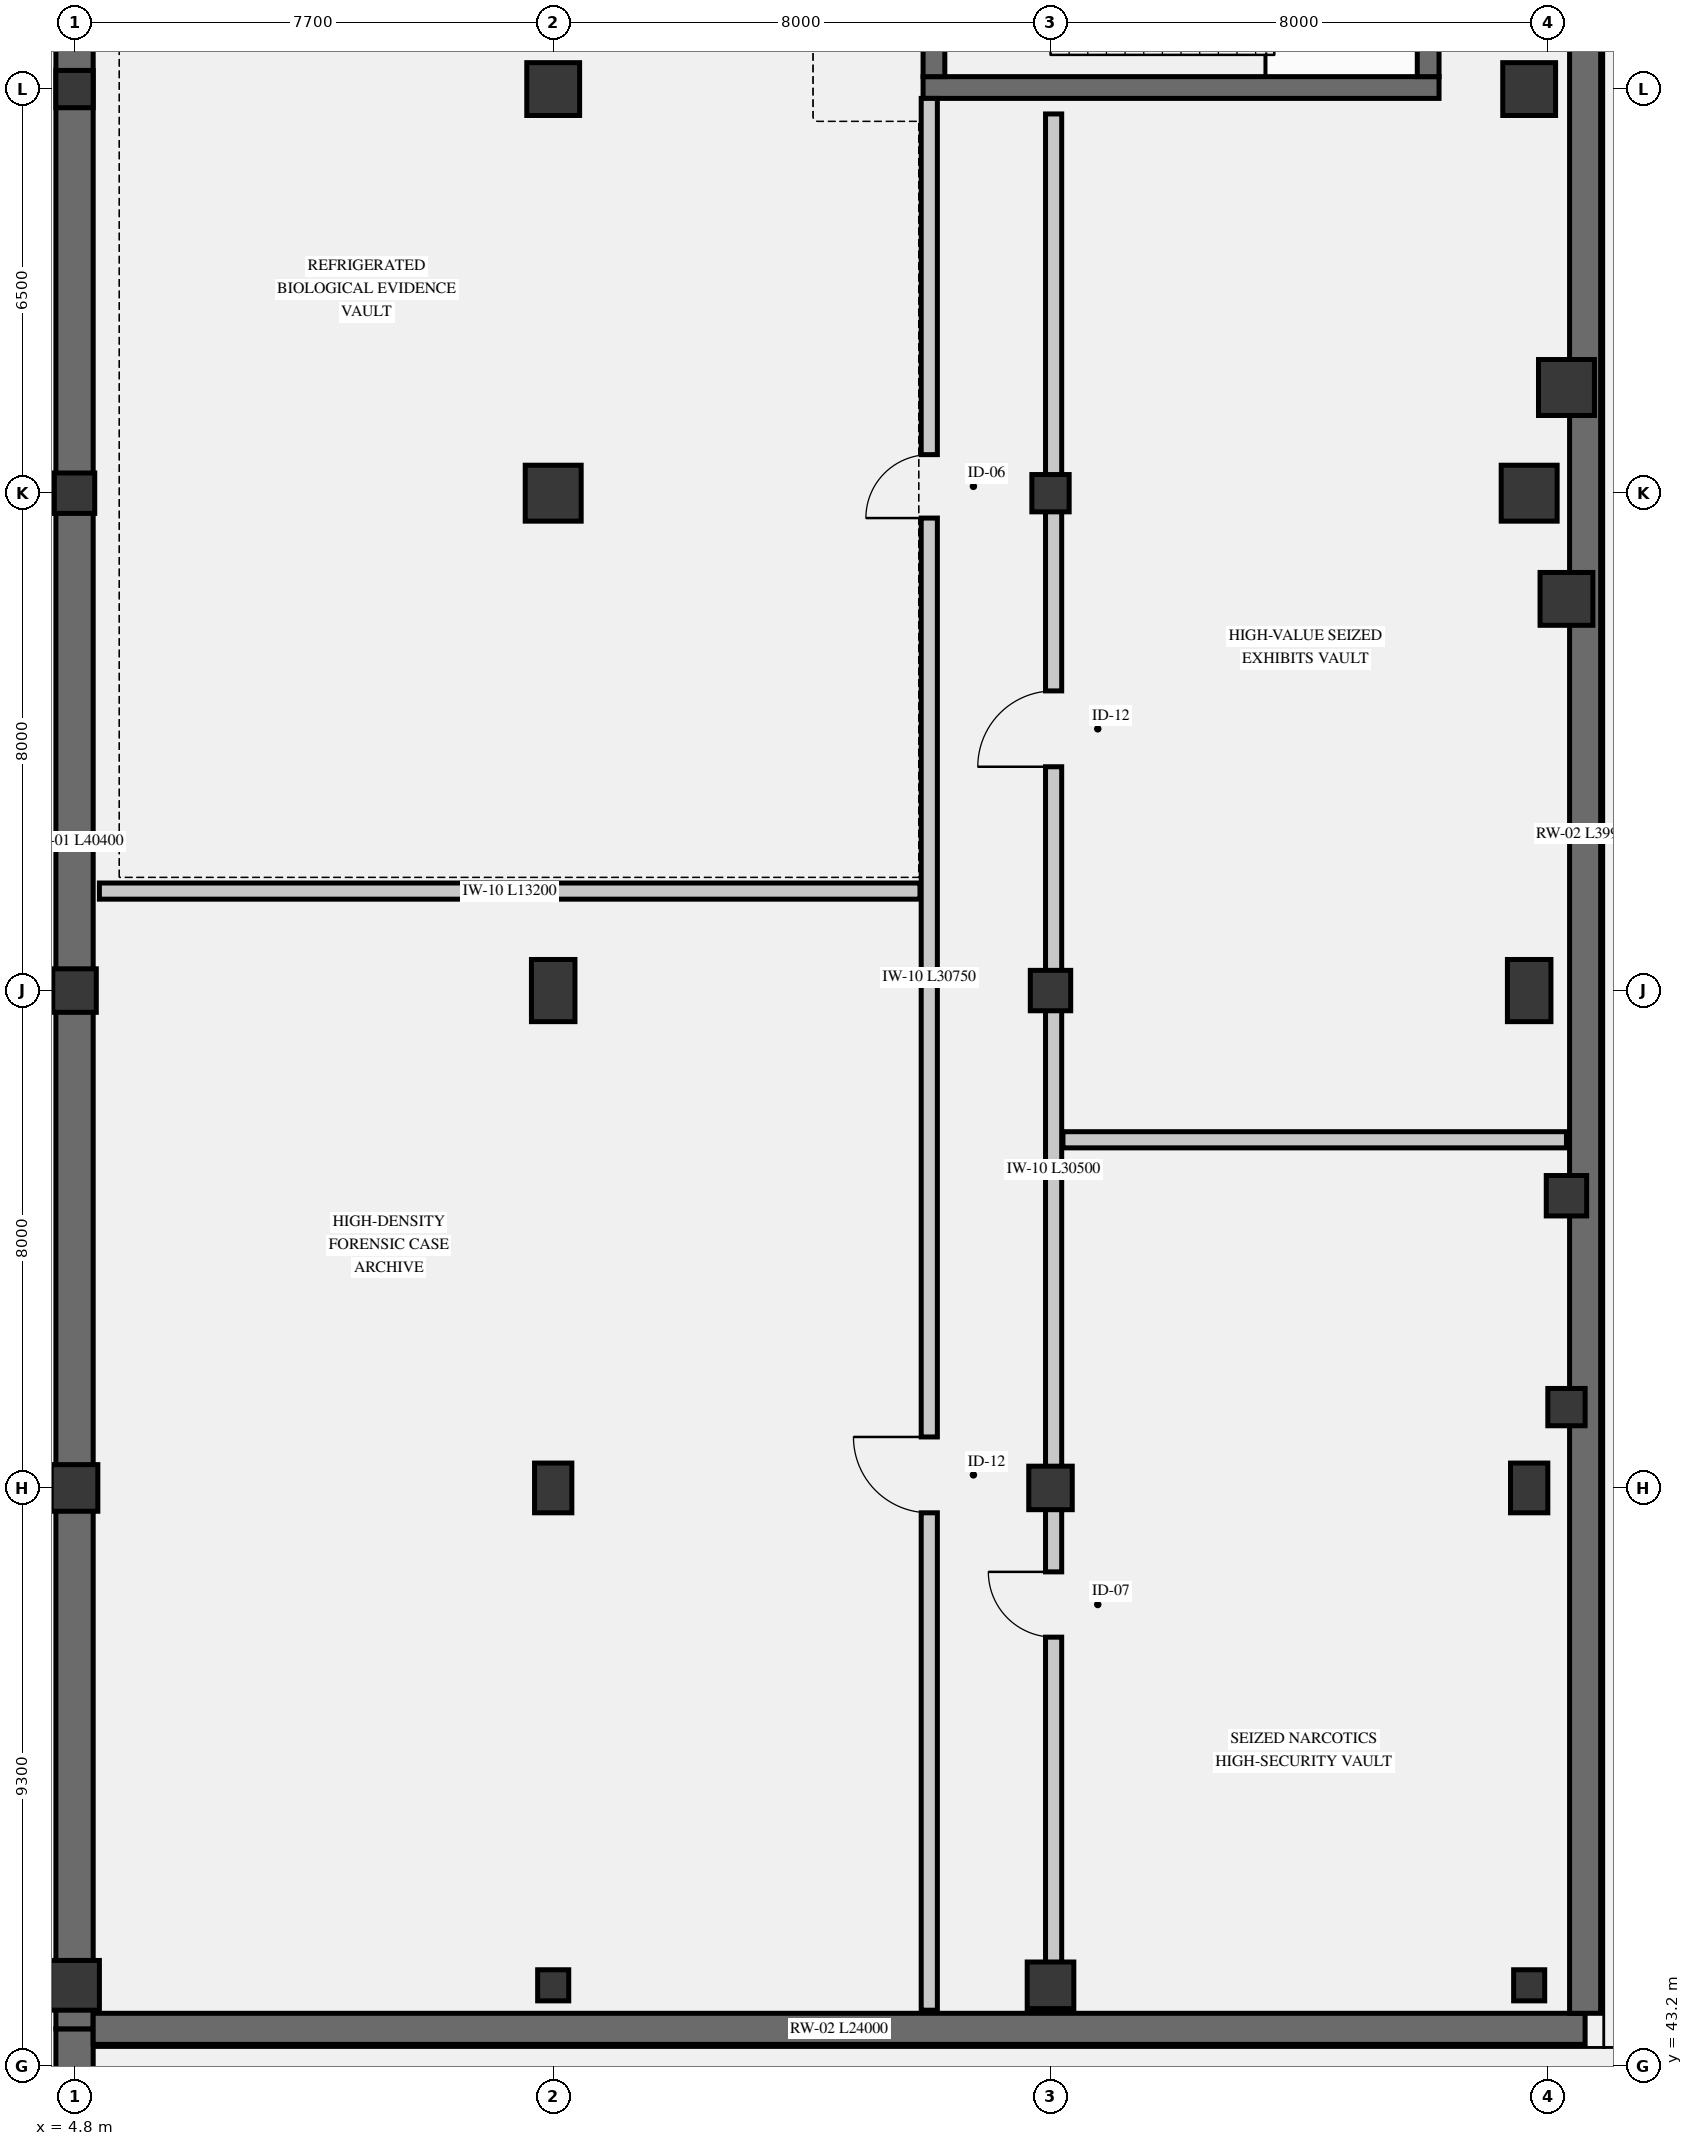
"""IFC4 building model, lengths in metres.
Left out: names, types, materials, properties, quantities, classifications, styles, units other than length and angle.
Written with IfcOpenShell. Run it as: python <this file> out.ifc"""

import sys

from ifc_helpers import new_model, si_unit, direction, frame, frame_2d, origin, origin_2d, place, context, subcontext, project, spatial, rectangle, extrude, element, fill, save


model = new_model("IFC4")
c1 = context("Model", 3, precision=1e-05, world=origin(), true_north=direction((0.0, 1.0)))
c2 = subcontext(c1, "Body", "Model", "MODEL_VIEW")
j1 = project(units=[si_unit("LENGTHUNIT", "METRE"), si_unit("PLANEANGLEUNIT", "RADIAN")], contexts=[c1])
p1 = place(None, origin())
s1 = spatial("IfcSite", under=j1, at=p1, CompositionType="ELEMENT")
p2 = place(p1, origin())
s2 = spatial("IfcBuilding", under=s1, at=p2, CompositionType="ELEMENT")
p3 = place(p2, frame((0.0, 0.0, -8.4)))
s3 = spatial("IfcBuildingStorey", under=s2, at=p3, CompositionType="ELEMENT", Elevation=-8.4)
p4 = place(p3, frame((4.8, 5.1, 0.0), z_axis=(0.0, 0.0, 1.0), x_axis=(0.0, 1.0, 0.0)))
e1 = element("IfcWall", 1, at=p4, inside=s3, PredefinedType="USERDEFINED", context=c2, shape_type="SweptSolid", body=[
    extrude(rectangle(XDim=38.7, YDim=0.6, at=frame_2d((19.35, 0.0))), origin(), (0.0, 0.0, 1.0), 4.2),
])
p5 = place(p3, frame((4.8, 43.8, 0.0), z_axis=(0.0, 0.0, 1.0), x_axis=(0.0, 1.0, 0.0)))
e2 = element("IfcWall", 2, at=p5, inside=s3, PredefinedType="USERDEFINED", context=c2, shape_type="SweptSolid", body=[
    extrude(rectangle(XDim=40.4, YDim=0.6, at=frame_2d((20.2, 0.0))), origin(), (0.0, 0.0, 1.0), 3.92),
])
p6 = place(p3, frame((5.1, 43.8, 0.0), z_axis=(0.0, 0.0, 1.0), x_axis=(1.0, 0.0, 0.0)))
e3 = element("IfcWall", 3, at=p6, inside=s3, PredefinedType="USERDEFINED", context=c2, shape_type="SweptSolid", body=[
    extrude(rectangle(XDim=24.0, YDim=0.5, at=frame_2d((12.0, 0.0))), origin(), (0.0, 0.0, 1.0), 3.92),
])
p7 = place(p3, frame((29.1, 44.05, 0.0), z_axis=(0.0, 0.0, 1.0), x_axis=(0.0, 1.0, 0.0)))
e4 = element("IfcWall", 4, at=p7, inside=s3, PredefinedType="USERDEFINED", context=c2, shape_type="SweptSolid", body=[
    extrude(rectangle(XDim=39.9, YDim=0.5, at=frame_2d((19.95, 0.0))), origin(), (0.0, 0.0, 1.0), 3.92),
])
p8 = place(p3, frame((18.45, 75.025, 0.0), z_axis=(0.0, 0.0, 1.0), x_axis=(1.0, 0.0, 0.0)))
e5 = element("IfcWall", 5, at=p8, inside=s3, PredefinedType="SHEAR", context=c2, shape_type="SweptSolid", body=[
    extrude(rectangle(XDim=8.3, YDim=0.35, at=frame_2d((4.15, 0.0))), origin(), (0.0, 0.0, 1.0), 3.92),
])
p9 = place(p3, frame((18.625, 75.2, 0.0), z_axis=(0.0, 0.0, 1.0), x_axis=(0.0, 1.0, 0.0)))
e6 = element("IfcWall", 6, at=p9, inside=s3, PredefinedType="SHEAR", context=c2, shape_type="SweptSolid", body=[
    extrude(rectangle(XDim=6.8, YDim=0.35, at=frame_2d((3.4, 0.0))), origin(), (0.0, 0.0, 1.0), 3.92),
])
p10 = place(p9, frame((2.6, 0.0, 0.0)))
e7 = element("IfcOpeningElement", 7, at=p10, cuts=e6, PredefinedType="OPENING", context=c2, shape_type="SweptSolid", body=[
    extrude(rectangle(XDim=1.25, YDim=2.2, at=frame_2d((0.625, 1.1))), frame((0.0, 0.185, 0.0), z_axis=(0.0, -1.0, 0.0), x_axis=(1.0, 0.0, 0.0)), (0.0, 0.0, 1.0), 0.37),
])
p11 = place(p3, frame((26.575, 75.2, 0.0), z_axis=(0.0, 0.0, 1.0), x_axis=(0.0, 1.0, 0.0)))
e8 = element("IfcWall", 8, at=p11, inside=s3, PredefinedType="SHEAR", context=c2, shape_type="SweptSolid", body=[
    extrude(rectangle(XDim=6.8, YDim=0.35, at=frame_2d((3.4, 0.0))), origin(), (0.0, 0.0, 1.0), 3.92),
])
p12 = place(p3, frame((28.8, 57.2, -0.44), z_axis=(0.0, 0.0, 1.0), x_axis=(1.0, 0.0, 0.0)))
e9 = element("IfcColumn", 9, at=p12, inside=s3, PredefinedType="COLUMN", context=c2, shape_type="SweptSolid", body=[
    extrude(rectangle(XDim=0.65, YDim=0.65, at=origin_2d()), origin(), (0.0, 0.0, 1.0), 4.64),
])
p13 = place(p3, frame((28.8, 53.8, -0.44), z_axis=(0.0, 0.0, 1.0), x_axis=(1.0, 0.0, 0.0)))
e10 = element("IfcColumn", 10, at=p13, inside=s3, PredefinedType="COLUMN", context=c2, shape_type="SweptSolid", body=[
    extrude(rectangle(XDim=0.6, YDim=0.6, at=origin_2d()), origin(), (0.0, 0.0, 1.0), 4.64),
])
p14 = place(p3, frame((28.8, 70.2, -0.44), z_axis=(0.0, 0.0, 1.0), x_axis=(1.0, 0.0, 0.0)))
e11 = element("IfcColumn", 11, at=p14, inside=s3, PredefinedType="COLUMN", context=c2, shape_type="SweptSolid", body=[
    extrude(rectangle(XDim=0.9, YDim=0.9, at=origin_2d()), origin(), (0.0, 0.0, 1.0), 4.64),
])
p15 = place(p3, frame((28.8, 66.8, -0.44), z_axis=(0.0, 0.0, 1.0), x_axis=(1.0, 0.0, 0.0)))
e12 = element("IfcColumn", 12, at=p15, inside=s3, PredefinedType="COLUMN", context=c2, shape_type="SweptSolid", body=[
    extrude(rectangle(XDim=0.85, YDim=0.85, at=origin_2d()), origin(), (0.0, 0.0, 1.0), 4.64),
])
p16 = place(p3, frame((4.8, 44.5, -0.44), z_axis=(0.0, 0.0, 1.0), x_axis=(1.0, 0.0, 0.0)))
e13 = element("IfcColumn", 13, at=p16, inside=s3, PredefinedType="COLUMN", context=c2, shape_type="SweptSolid", body=[
    extrude(rectangle(XDim=0.8, YDim=0.8, at=origin_2d()), origin(), (0.0, 0.0, 1.0), 4.64),
])
p17 = place(p3, frame((4.8, 52.5, -0.44), z_axis=(0.0, 0.0, 1.0), x_axis=(1.0, 0.0, 0.0)))
e14 = element("IfcColumn", 14, at=p17, inside=s3, PredefinedType="COLUMN", context=c2, shape_type="SweptSolid", body=[
    extrude(rectangle(XDim=0.75, YDim=0.75, at=origin_2d()), origin(), (0.0, 0.0, 1.0), 4.64),
])
p18 = place(p3, frame((4.8, 60.5, -0.44), z_axis=(0.0, 0.0, 1.0), x_axis=(1.0, 0.0, 0.0)))
e15 = element("IfcColumn", 15, at=p18, inside=s3, PredefinedType="COLUMN", context=c2, shape_type="SweptSolid", body=[
    extrude(rectangle(XDim=0.7, YDim=0.7, at=origin_2d()), origin(), (0.0, 0.0, 1.0), 4.64),
])
p19 = place(p3, frame((4.8, 68.5, -0.44), z_axis=(0.0, 0.0, 1.0), x_axis=(1.0, 0.0, 0.0)))
e16 = element("IfcColumn", 16, at=p19, inside=s3, PredefinedType="COLUMN", context=c2, shape_type="SweptSolid", body=[
    extrude(rectangle(XDim=0.65, YDim=0.65, at=origin_2d()), origin(), (0.0, 0.0, 1.0), 4.64),
])
p20 = place(p3, frame((4.8, 75.0, -0.44), z_axis=(0.0, 0.0, 1.0), x_axis=(1.0, 0.0, 0.0)))
e17 = element("IfcColumn", 17, at=p20, inside=s3, PredefinedType="COLUMN", context=c2, shape_type="SweptSolid", body=[
    extrude(rectangle(XDim=0.6, YDim=0.6, at=origin_2d()), origin(), (0.0, 0.0, 1.0), 4.64),
])
p21 = place(p3, frame((12.5, 44.5, -0.44), z_axis=(0.0, 0.0, 1.0), x_axis=(1.0, 0.0, 0.0)))
e18 = element("IfcColumn", 18, at=p21, inside=s3, PredefinedType="COLUMN", context=c2, shape_type="SweptSolid", body=[
    extrude(rectangle(XDim=0.5, YDim=0.5, at=origin_2d()), origin(), (0.0, 0.0, 1.0), 4.64),
])
p22 = place(p3, frame((12.5, 52.5, -0.44), z_axis=(0.0, 0.0, 1.0), x_axis=(1.0, 0.0, 0.0)))
e19 = element("IfcColumn", 19, at=p22, inside=s3, PredefinedType="COLUMN", context=c2, shape_type="SweptSolid", body=[
    extrude(rectangle(XDim=0.6, YDim=0.8, at=origin_2d()), origin(), (0.0, 0.0, 1.0), 4.64),
])
p23 = place(p3, frame((12.5, 60.5, -0.44), z_axis=(0.0, 0.0, 1.0), x_axis=(1.0, 0.0, 0.0)))
e20 = element("IfcColumn", 20, at=p23, inside=s3, PredefinedType="COLUMN", context=c2, shape_type="SweptSolid", body=[
    extrude(rectangle(XDim=0.7, YDim=1.0, at=origin_2d()), origin(), (0.0, 0.0, 1.0), 4.64),
])
p24 = place(p3, frame((12.5, 68.5, -0.44), z_axis=(0.0, 0.0, 1.0), x_axis=(1.0, 0.0, 0.0)))
e21 = element("IfcColumn", 21, at=p24, inside=s3, PredefinedType="COLUMN", context=c2, shape_type="SweptSolid", body=[
    extrude(rectangle(XDim=0.9, YDim=0.9, at=origin_2d()), origin(), (0.0, 0.0, 1.0), 4.64),
])
p25 = place(p3, frame((12.5, 75.0, -0.44), z_axis=(0.0, 0.0, 1.0), x_axis=(1.0, 0.0, 0.0)))
e22 = element("IfcColumn", 22, at=p25, inside=s3, PredefinedType="COLUMN", context=c2, shape_type="SweptSolid", body=[
    extrude(rectangle(XDim=0.85, YDim=0.85, at=origin_2d()), origin(), (0.0, 0.0, 1.0), 4.64),
])
p26 = place(p3, frame((20.5, 44.5, -0.44), z_axis=(0.0, 0.0, 1.0), x_axis=(1.0, 0.0, 0.0)))
e23 = element("IfcColumn", 23, at=p26, inside=s3, PredefinedType="COLUMN", context=c2, shape_type="SweptSolid", body=[
    extrude(rectangle(XDim=0.75, YDim=0.75, at=origin_2d()), origin(), (0.0, 0.0, 1.0), 4.64),
])
p27 = place(p3, frame((20.5, 52.5, -0.44), z_axis=(0.0, 0.0, 1.0), x_axis=(1.0, 0.0, 0.0)))
e24 = element("IfcColumn", 24, at=p27, inside=s3, PredefinedType="COLUMN", context=c2, shape_type="SweptSolid", body=[
    extrude(rectangle(XDim=0.7, YDim=0.7, at=origin_2d()), origin(), (0.0, 0.0, 1.0), 4.64),
])
p28 = place(p3, frame((20.5, 60.5, -0.44), z_axis=(0.0, 0.0, 1.0), x_axis=(1.0, 0.0, 0.0)))
e25 = element("IfcColumn", 25, at=p28, inside=s3, PredefinedType="COLUMN", context=c2, shape_type="SweptSolid", body=[
    extrude(rectangle(XDim=0.65, YDim=0.65, at=origin_2d()), origin(), (0.0, 0.0, 1.0), 4.64),
])
p29 = place(p3, frame((20.5, 68.5, -0.44), z_axis=(0.0, 0.0, 1.0), x_axis=(1.0, 0.0, 0.0)))
e26 = element("IfcColumn", 26, at=p29, inside=s3, PredefinedType="COLUMN", context=c2, shape_type="SweptSolid", body=[
    extrude(rectangle(XDim=0.6, YDim=0.6, at=origin_2d()), origin(), (0.0, 0.0, 1.0), 4.64),
])
p30 = place(p3, frame((28.2, 44.5, -0.44), z_axis=(0.0, 0.0, 1.0), x_axis=(1.0, 0.0, 0.0)))
e27 = element("IfcColumn", 27, at=p30, inside=s3, PredefinedType="COLUMN", context=c2, shape_type="SweptSolid", body=[
    extrude(rectangle(XDim=0.5, YDim=0.5, at=origin_2d()), origin(), (0.0, 0.0, 1.0), 4.64),
])
p31 = place(p3, frame((28.2, 52.5, -0.44), z_axis=(0.0, 0.0, 1.0), x_axis=(1.0, 0.0, 0.0)))
e28 = element("IfcColumn", 28, at=p31, inside=s3, PredefinedType="COLUMN", context=c2, shape_type="SweptSolid", body=[
    extrude(rectangle(XDim=0.6, YDim=0.8, at=origin_2d()), origin(), (0.0, 0.0, 1.0), 4.64),
])
p32 = place(p3, frame((28.2, 60.5, -0.44), z_axis=(0.0, 0.0, 1.0), x_axis=(1.0, 0.0, 0.0)))
e29 = element("IfcColumn", 29, at=p32, inside=s3, PredefinedType="COLUMN", context=c2, shape_type="SweptSolid", body=[
    extrude(rectangle(XDim=0.7, YDim=1.0, at=origin_2d()), origin(), (0.0, 0.0, 1.0), 4.64),
])
p33 = place(p3, frame((28.2, 68.5, -0.44), z_axis=(0.0, 0.0, 1.0), x_axis=(1.0, 0.0, 0.0)))
e30 = element("IfcColumn", 30, at=p33, inside=s3, PredefinedType="COLUMN", context=c2, shape_type="SweptSolid", body=[
    extrude(rectangle(XDim=0.9, YDim=0.9, at=origin_2d()), origin(), (0.0, 0.0, 1.0), 4.64),
])
p34 = place(p3, frame((28.2, 75.0, -0.44), z_axis=(0.0, 0.0, 1.0), x_axis=(1.0, 0.0, 0.0)))
e31 = element("IfcColumn", 31, at=p34, inside=s3, PredefinedType="COLUMN", context=c2, shape_type="SweptSolid", body=[
    extrude(rectangle(XDim=0.85, YDim=0.85, at=origin_2d()), origin(), (0.0, 0.0, 1.0), 4.64),
])
p35 = place(p3, frame((18.55, 44.1, 0.0), z_axis=(0.0, 0.0, 1.0), x_axis=(0.0, 1.0, 0.0)))
e32 = element("IfcWall", 32, at=p35, inside=s3, PredefinedType="PARTITIONING", context=c2, shape_type="SweptSolid", body=[
    extrude(rectangle(XDim=30.75, YDim=0.26, at=frame_2d((15.375, 0.0))), origin(), (0.0, 0.0, 1.0), 3.208),
])
p36 = place(p35, frame((8.0, 0.0, 0.0)))
e33 = element("IfcOpeningElement", 33, at=p36, cuts=e32, PredefinedType="OPENING", context=c2, shape_type="SweptSolid", body=[
    extrude(rectangle(XDim=1.22, YDim=2.25, at=frame_2d((0.61, 1.125))), frame((0.0, 0.14, 0.0), z_axis=(0.0, -1.0, 0.0), x_axis=(1.0, 0.0, 0.0)), (0.0, 0.0, 1.0), 0.28),
])
p37 = place(p35, frame((24.0, 0.0, 0.0)))
e34 = element("IfcOpeningElement", 34, at=p37, cuts=e32, PredefinedType="OPENING", context=c2, shape_type="SweptSolid", body=[
    extrude(rectangle(XDim=1.02, YDim=2.18, at=frame_2d((0.51, 1.09))), frame((0.0, 0.14, 0.0), z_axis=(0.0, -1.0, 0.0), x_axis=(1.0, 0.0, 0.0)), (0.0, 0.0, 1.0), 0.28),
])
p38 = place(p3, frame((20.55, 44.1, 0.0), z_axis=(0.0, 0.0, 1.0), x_axis=(0.0, 1.0, 0.0)))
e35 = element("IfcWall", 35, at=p38, inside=s3, PredefinedType="PARTITIONING", context=c2, shape_type="SweptSolid", body=[
    extrude(rectangle(XDim=30.5, YDim=0.26, at=frame_2d((15.25, 0.0))), origin(), (0.0, 0.0, 1.0), 3.16),
])
p39 = place(p38, frame((6.0, 0.0, 0.0)))
e36 = element("IfcOpeningElement", 36, at=p39, cuts=e35, PredefinedType="OPENING", context=c2, shape_type="SweptSolid", body=[
    extrude(rectangle(XDim=1.05, YDim=2.2, at=frame_2d((0.525, 1.1))), frame((0.0, 0.14, 0.0), z_axis=(0.0, -1.0, 0.0), x_axis=(1.0, 0.0, 0.0)), (0.0, 0.0, 1.0), 0.28),
])
p40 = place(p38, frame((20.0, 0.0, 0.0)))
e37 = element("IfcOpeningElement", 37, at=p40, cuts=e35, PredefinedType="OPENING", context=c2, shape_type="SweptSolid", body=[
    extrude(rectangle(XDim=1.22, YDim=2.25, at=frame_2d((0.61, 1.125))), frame((0.0, 0.14, 0.0), z_axis=(0.0, -1.0, 0.0), x_axis=(1.0, 0.0, 0.0)), (0.0, 0.0, 1.0), 0.28),
])
p41 = place(p3, frame((5.2, 62.1, 0.0), z_axis=(0.0, 0.0, 1.0), x_axis=(1.0, 0.0, 0.0)))
e38 = element("IfcWall", 38, at=p41, inside=s3, PredefinedType="PARTITIONING", context=c2, shape_type="SweptSolid", body=[
    extrude(rectangle(XDim=13.2, YDim=0.26, at=frame_2d((6.6, 0.0))), origin(), (0.0, 0.0, 1.0), 3.158),
])
p42 = place(p3, frame((20.7, 58.1, 0.0), z_axis=(0.0, 0.0, 1.0), x_axis=(1.0, 0.0, 0.0)))
e39 = element("IfcWall", 39, at=p42, inside=s3, PredefinedType="PARTITIONING", context=c2, shape_type="SweptSolid", body=[
    extrude(rectangle(XDim=8.1, YDim=0.26, at=frame_2d((4.05, 0.0))), origin(), (0.0, 0.0, 1.0), 3.158),
])
p43 = place(p36, origin())
e40 = element("IfcDoor", 40, at=p43, inside=s3, OperationType="SINGLE_SWING_RIGHT", PredefinedType="DOOR", context=c2, shape_type="SweptSolid", body=[
    extrude(rectangle(XDim=1.22, YDim=2.25, at=frame_2d((0.61, 1.125))), frame((0.0, 0.025, 0.0), z_axis=(0.0, -1.0, 0.0), x_axis=(1.0, 0.0, 0.0)), (0.0, 0.0, 1.0), 0.05),
])
fill(e33, e40)
p44 = place(p37, origin())
e41 = element("IfcDoor", 41, at=p44, inside=s3, OperationType="SINGLE_SWING_LEFT", PredefinedType="DOOR", context=c2, shape_type="SweptSolid", body=[
    extrude(rectangle(XDim=1.02, YDim=2.18, at=frame_2d((0.51, 1.09))), frame((0.0, 0.025, 0.0), z_axis=(0.0, -1.0, 0.0), x_axis=(1.0, 0.0, 0.0)), (0.0, 0.0, 1.0), 0.05),
])
fill(e34, e41)
p45 = place(p39, origin())
e42 = element("IfcDoor", 42, at=p45, inside=s3, OperationType="SINGLE_SWING_RIGHT", PredefinedType="DOOR", context=c2, shape_type="SweptSolid", body=[
    extrude(rectangle(XDim=1.05, YDim=2.2, at=frame_2d((0.525, 1.1))), frame((0.0, 0.025, 0.0), z_axis=(0.0, -1.0, 0.0), x_axis=(1.0, 0.0, 0.0)), (0.0, 0.0, 1.0), 0.05),
])
fill(e36, e42)
p46 = place(p40, origin())
e43 = element("IfcDoor", 43, at=p46, inside=s3, OperationType="SINGLE_SWING_LEFT", PredefinedType="DOOR", context=c2, shape_type="SweptSolid", body=[
    extrude(rectangle(XDim=1.22, YDim=2.25, at=frame_2d((0.61, 1.125))), frame((0.0, 0.025, 0.0), z_axis=(0.0, -1.0, 0.0), x_axis=(1.0, 0.0, 0.0)), (0.0, 0.0, 1.0), 0.05),
])
fill(e37, e43)
save(model, sys.argv[1])
